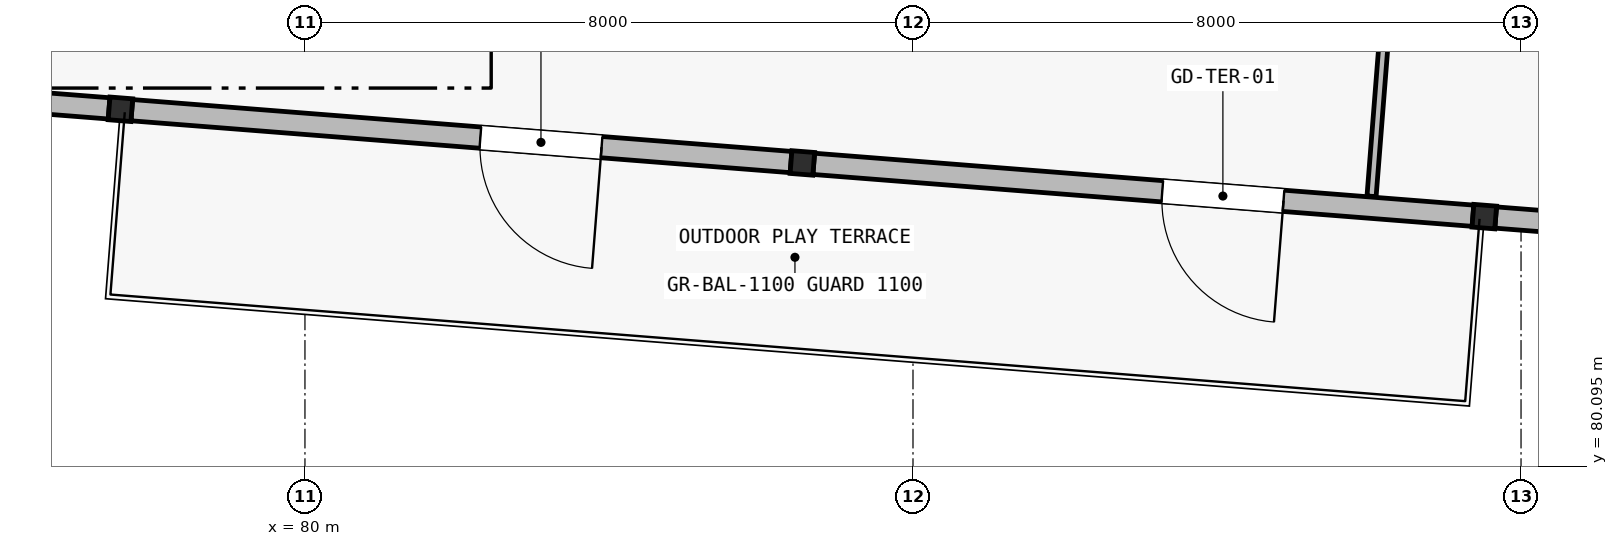
"""IFC4 building model, lengths in metres.
Left out: names, types, materials, properties, quantities, classifications, styles, units other than length and angle.
Written with IfcOpenShell. Run it as: python <this file> out.ifc"""

import sys

from ifc_helpers import new_model, si_unit, direction, frame, frame_2d, origin, origin_2d, place, context, subcontext, project, spatial, rectangle, hollow_rectangle, extrude, element, fill, save


model = new_model("IFC4")
c1 = context("Model", 3, precision=1e-05, world=origin(), true_north=direction((0.0, 1.0)))
c2 = subcontext(c1, "Body", "Model", "MODEL_VIEW")
j1 = project(units=[si_unit("LENGTHUNIT", "METRE"), si_unit("PLANEANGLEUNIT", "RADIAN")], contexts=[c1])
p1 = place(None, origin())
s1 = spatial("IfcSite", under=j1, at=p1, CompositionType="ELEMENT")
p2 = place(p1, origin())
s2 = spatial("IfcBuilding", under=s1, at=p2, CompositionType="ELEMENT")
p3 = place(p2, frame((0.0, 0.0, 8.4)))
s3 = spatial("IfcBuildingStorey", under=s2, at=p3, CompositionType="ELEMENT", Elevation=8.4)
p4 = place(p3, frame((77.572, 84.794, 0.0), z_axis=(0.0, 0.0, 1.0), x_axis=(0.996917333733, -0.078459095728, 0.0)))
e1 = element("IfcColumn", 1, at=p4, inside=s3, PredefinedType="COLUMN", context=c2, shape_type="SweptSolid", body=[
    extrude(hollow_rectangle(XDim=0.3, YDim=0.3, WallThickness=0.016, at=origin_2d()), origin(), (0.0, 0.0, 1.0), 3.47),
])
p5 = place(p3, frame((86.544, 84.088, 0.0), z_axis=(0.0, 0.0, 1.0), x_axis=(0.996917333733, -0.078459095728, 0.0)))
e2 = element("IfcColumn", 2, at=p5, inside=s3, PredefinedType="COLUMN", context=c2, shape_type="SweptSolid", body=[
    extrude(hollow_rectangle(XDim=0.3, YDim=0.3, WallThickness=0.016, at=origin_2d()), origin(), (0.0, 0.0, 1.0), 4.87),
])
p6 = place(p3, frame((95.517, 83.382, 0.0), z_axis=(0.0, 0.0, 1.0), x_axis=(0.996917333733, -0.078459095728, 0.0)))
e3 = element("IfcColumn", 3, at=p6, inside=s3, PredefinedType="COLUMN", context=c2, shape_type="SweptSolid", body=[
    extrude(hollow_rectangle(XDim=0.3, YDim=0.3, WallThickness=0.016, at=origin_2d()), origin(), (0.0, 0.0, 1.0), 3.57),
])
p7 = place(p3, frame((77.423, 84.806, 0.0), z_axis=(0.0, 0.0, 1.0), x_axis=(-0.996917066238, 0.078462494502, 0.0)))
e4 = element("IfcWall", 4, at=p7, inside=s3, PredefinedType="SOLIDWALL", context=c2, shape_type="SweptSolid", body=[
    extrude(rectangle(XDim=8.7, YDim=0.28, at=frame_2d((4.35, 0.0))), origin(), (0.0, 0.0, 1.0), 2.58),
])
p8 = place(p7, frame((4.0, 0.0, 0.2)))
e5 = element("IfcOpeningElement", 5, at=p8, cuts=e4, PredefinedType="OPENING", context=c2, shape_type="SweptSolid", body=[
    extrude(rectangle(XDim=0.7, YDim=2.14, at=frame_2d((0.35, 1.07))), frame((0.0, 0.155, 0.0), z_axis=(0.0, -1.0, 0.0), x_axis=(1.0, 0.0, 0.0)), (0.0, 0.0, 1.0), 0.31),
])
p9 = place(p3, frame((86.395, 84.1, 0.0), z_axis=(0.0, 0.0, 1.0), x_axis=(-0.996919433544, 0.078432410537, 0.0)))
e6 = element("IfcWall", 6, at=p9, inside=s3, PredefinedType="SOLIDWALL", context=c2, shape_type="SweptSolid", body=[
    extrude(rectangle(XDim=8.7, YDim=0.28, at=frame_2d((4.35, 0.0))), origin(), (0.0, 0.0, 1.0), 2.58),
])
p10 = place(p9, frame((2.5, 0.0, 0.0)))
e7 = element("IfcOpeningElement", 7, at=p10, cuts=e6, PredefinedType="OPENING", context=c2, shape_type="SweptSolid", body=[
    extrude(rectangle(XDim=1.6, YDim=2.15, at=frame_2d((0.8, 1.075))), frame((0.0, 0.155, 0.0), z_axis=(0.0, -1.0, 0.0), x_axis=(1.0, 0.0, 0.0)), (0.0, 0.0, 1.0), 0.31),
])
p11 = place(p3, frame((95.367, 83.393, 0.0), z_axis=(0.0, 0.0, 1.0), x_axis=(-0.996917066238, 0.078462494502, 0.0)))
e8 = element("IfcWall", 8, at=p11, inside=s3, PredefinedType="SOLIDWALL", context=c2, shape_type="SweptSolid", body=[
    extrude(rectangle(XDim=8.7, YDim=0.28, at=frame_2d((4.35, 0.0))), origin(), (0.0, 0.0, 1.0), 2.58),
])
p12 = place(p11, frame((2.5, 0.0, 0.0)))
e9 = element("IfcOpeningElement", 9, at=p12, cuts=e8, PredefinedType="OPENING", context=c2, shape_type="SweptSolid", body=[
    extrude(rectangle(XDim=1.6, YDim=2.15, at=frame_2d((0.8, 1.075))), frame((0.0, 0.155, 0.0), z_axis=(0.0, -1.0, 0.0), x_axis=(1.0, 0.0, 0.0)), (0.0, 0.0, 1.0), 0.31),
])
p13 = place(p3, frame((104.34, 82.687, 0.0), z_axis=(0.0, 0.0, 1.0), x_axis=(-0.996917238993, 0.078460299505, 0.0)))
e10 = element("IfcWall", 10, at=p13, inside=s3, PredefinedType="SOLIDWALL", context=c2, shape_type="SweptSolid", body=[
    extrude(rectangle(XDim=8.7, YDim=0.28, at=frame_2d((4.35, 0.0))), origin(), (0.0, 0.0, 1.0), 2.58),
])
p14 = place(p13, frame((4.0, 0.0, 0.2)))
e11 = element("IfcOpeningElement", 11, at=p14, cuts=e10, PredefinedType="OPENING", context=c2, shape_type="SweptSolid", body=[
    extrude(rectangle(XDim=0.7, YDim=2.14, at=frame_2d((0.35, 1.07))), frame((0.0, 0.155, 0.0), z_axis=(0.0, -1.0, 0.0), x_axis=(1.0, 0.0, 0.0)), (0.0, 0.0, 1.0), 0.31),
])
p15 = place(p3, frame((94.033, 83.649, 0.0), z_axis=(0.0, 0.0, 1.0), x_axis=(0.078442108986, 0.996918670473, 0.0)))
e12 = element("IfcWall", 12, at=p15, inside=s3, PredefinedType="PARTITIONING", context=c2, shape_type="SweptSolid", body=[
    extrude(rectangle(XDim=7.7, YDim=0.12, at=frame_2d((3.85, 0.0))), origin(), (0.0, 0.0, 1.0), 2.98),
])
p16 = place(p10, origin())
e13 = element("IfcDoor", 13, at=p16, inside=s3, OperationType="DOUBLE_DOOR_SINGLE_SWING", PredefinedType="DOOR", context=c2, shape_type="SweptSolid", body=[
    extrude(rectangle(XDim=1.6, YDim=2.15, at=frame_2d((0.8, 1.075))), frame((0.0, 0.025, 0.0), z_axis=(0.0, -1.0, 0.0), x_axis=(1.0, 0.0, 0.0)), (0.0, 0.0, 1.0), 0.05),
])
fill(e7, e13)
p17 = place(p12, origin())
e14 = element("IfcDoor", 14, at=p17, inside=s3, OperationType="DOUBLE_DOOR_SINGLE_SWING", PredefinedType="DOOR", context=c2, shape_type="SweptSolid", body=[
    extrude(rectangle(XDim=1.6, YDim=2.15, at=frame_2d((0.8, 1.075))), frame((0.0, 0.025, 0.0), z_axis=(0.0, -1.0, 0.0), x_axis=(1.0, 0.0, 0.0)), (0.0, 0.0, 1.0), 0.05),
])
fill(e9, e14)
save(model, sys.argv[1])
